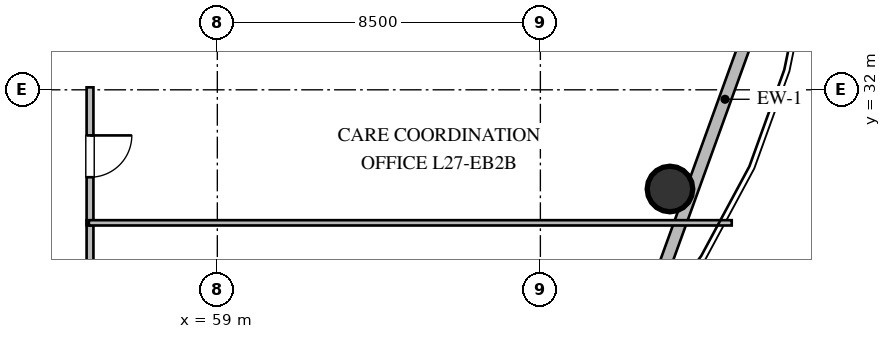
"""IFC4 building model, lengths in metres.
Left out: names, types, materials, properties, quantities, classifications, styles, units other than length and angle.
Written with IfcOpenShell. Run it as: python <this file> out.ifc"""

import sys

from ifc_helpers import new_model, si_unit, direction, frame, frame_2d, origin, origin_2d, place, context, subcontext, project, spatial, rectangle, circle, extrude, element, fill, save


model = new_model("IFC4")
c1 = context("Model", 3, precision=1e-05, world=origin(), true_north=direction((0.0, 1.0)))
c2 = subcontext(c1, "Body", "Model", "MODEL_VIEW")
j1 = project(units=[si_unit("LENGTHUNIT", "METRE"), si_unit("PLANEANGLEUNIT", "RADIAN")], contexts=[c1])
p1 = place(None, origin())
s1 = spatial("IfcSite", under=j1, at=p1, CompositionType="ELEMENT")
p2 = place(p1, origin())
s2 = spatial("IfcBuilding", under=s1, at=p2, CompositionType="ELEMENT")
p3 = place(p2, frame((0.0, 0.0, 106.2)))
s3 = spatial("IfcBuildingStorey", under=s2, at=p3, CompositionType="ELEMENT", Elevation=106.2)
p4 = place(p3, frame((70.91, 29.39, 0.0), z_axis=(0.0, 0.0, 1.0), x_axis=(1.0, 0.0, 0.0)))
e1 = element("IfcColumn", 1, at=p4, inside=s3, PredefinedType="COLUMN", context=c2, shape_type="SweptSolid", body=[
    extrude(circle(Radius=0.6, at=origin_2d()), origin(), (0.0, 0.0, 1.0), 3.6),
])
p5 = place(p3, frame((74.708, 38.244, 0.0), z_axis=(0.0, 0.0, 1.0), x_axis=(-0.340324669139, -0.94030799187, 0.0)))
e2 = element("IfcWall", 2, at=p5, inside=s3, PredefinedType="STANDARD", context=c2, shape_type="SweptSolid", body=[
    extrude(rectangle(XDim=13.81, YDim=0.32, at=frame_2d((6.905, 0.0))), origin(), (0.0, 0.0, 1.0), 3.36),
])
p6 = place(p3, frame((55.65, 28.565, 0.0), z_axis=(0.0, 0.0, 1.0), x_axis=(0.0, -1.0, 0.0)))
e3 = element("IfcWall", 3, at=p6, inside=s3, PredefinedType="PARTITIONING", context=c2, shape_type="SweptSolid", body=[
    extrude(rectangle(XDim=3.63, YDim=0.18, at=frame_2d((1.815, 0.0))), origin(), (0.0, 0.0, 1.0), 3.36),
])
p7 = place(p6, frame((1.265, 0.0, 0.0)))
e4 = element("IfcOpeningElement", 4, at=p7, cuts=e3, PredefinedType="OPENING", context=c2, shape_type="SweptSolid", body=[
    extrude(rectangle(XDim=1.1, YDim=2.1, at=frame_2d((0.55, 1.05))), frame((0.0, 0.1, 0.0), z_axis=(0.0, -1.0, 0.0), x_axis=(1.0, 0.0, 0.0)), (0.0, 0.0, 1.0), 0.2),
])
p8 = place(p3, frame((55.65, 32.065, 0.0), z_axis=(0.0, 0.0, 1.0), x_axis=(0.0, -1.0, 0.0)))
e5 = element("IfcWall", 5, at=p8, inside=s3, PredefinedType="PARTITIONING", context=c2, shape_type="SweptSolid", body=[
    extrude(rectangle(XDim=3.63, YDim=0.18, at=frame_2d((1.815, 0.0))), origin(), (0.0, 0.0, 1.0), 3.36),
])
p9 = place(p8, frame((1.265, 0.0, 0.0)))
e6 = element("IfcOpeningElement", 6, at=p9, cuts=e5, PredefinedType="OPENING", context=c2, shape_type="SweptSolid", body=[
    extrude(rectangle(XDim=1.1, YDim=2.1, at=frame_2d((0.55, 1.05))), frame((0.0, 0.1, 0.0), z_axis=(0.0, -1.0, 0.0), x_axis=(1.0, 0.0, 0.0)), (0.0, 0.0, 1.0), 0.2),
])
p10 = place(p3, frame((55.62, 28.5, 0.0), z_axis=(0.0, 0.0, 1.0), x_axis=(1.0, 0.0, 0.0)))
e7 = element("IfcWall", 7, at=p10, inside=s3, PredefinedType="PARTITIONING", context=c2, shape_type="SweptSolid", body=[
    extrude(rectangle(XDim=16.915, YDim=0.14, at=frame_2d((8.458, 0.0))), origin(), (0.0, 0.0, 1.0), 2.89),
])
p11 = place(p9, origin())
e8 = element("IfcDoor", 8, at=p11, inside=s3, OperationType="SINGLE_SWING_LEFT", PredefinedType="DOOR", context=c2, shape_type="SweptSolid", body=[
    extrude(rectangle(XDim=1.1, YDim=2.1, at=frame_2d((0.55, 1.05))), frame((0.0, 0.025, 0.0), z_axis=(0.0, -1.0, 0.0), x_axis=(1.0, 0.0, 0.0)), (0.0, 0.0, 1.0), 0.05),
])
fill(e6, e8)
save(model, sys.argv[1])
